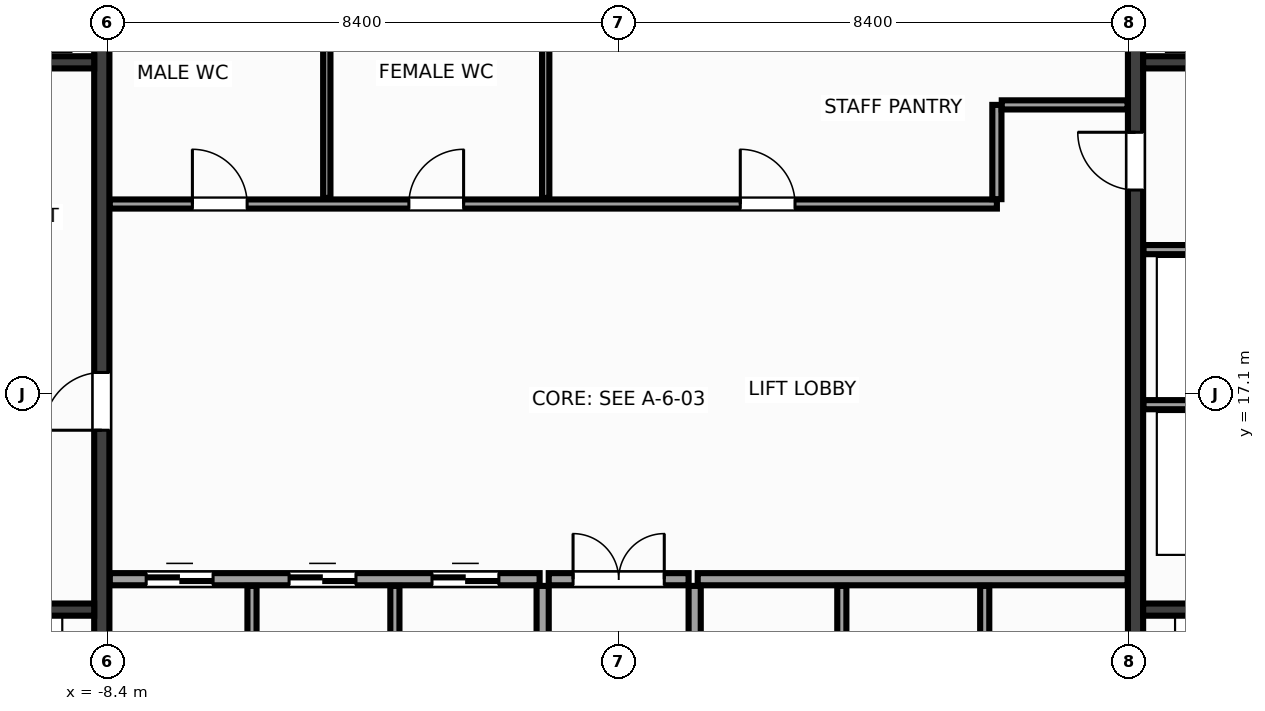
"""IFC4 building model, lengths in metres.
Left out: names, types, materials, properties, quantities, classifications, styles, units other than length and angle.
Written with IfcOpenShell. Run it as: python <this file> out.ifc"""

import sys

from ifc_helpers import new_model, si_unit, direction, frame, frame_2d, origin, place, context, subcontext, project, spatial, rectangle, extrude, source, transform, mapped, element, fill, save


model = new_model("IFC4")
c1 = context("Model", 3, precision=1e-05, world=origin(), true_north=direction((0.0, 1.0)))
c2 = subcontext(c1, "Body", "Model", "MODEL_VIEW")
j1 = project(units=[si_unit("LENGTHUNIT", "METRE"), si_unit("PLANEANGLEUNIT", "RADIAN")], contexts=[c1])
p1 = place(None, origin())
s1 = spatial("IfcSite", under=j1, at=p1, CompositionType="ELEMENT")
p2 = place(p1, origin())
s2 = spatial("IfcBuilding", under=s1, at=p2, CompositionType="ELEMENT")
p3 = place(p2, frame((0.0, 0.0, 23.6)))
s3 = spatial("IfcBuildingStorey", under=s2, at=p3, CompositionType="ELEMENT", Elevation=23.6)
m1 = source(origin(), c2, "Body", "SweptSolid", [
    extrude(rectangle(XDim=12.8, YDim=0.25, at=frame_2d((6.4, 0.0))), origin(), (0.0, 0.0, 1.0), 3.6),
])
p4 = place(p3, frame((-8.5, 10.6, 0.0), z_axis=(0.0, 0.0, 1.0), x_axis=(0.0, 1.0, 0.0)))
e1 = element("IfcWall", 1, at=p4, inside=s3, PredefinedType="SHEAR", context=c2, shape_type="MappedRepresentation", body=[
    mapped(m1, transform((0.0, 0.0, 0.0), x_axis=(1.0, 0.0, 0.0), y_axis=(0.0, 1.0, 0.0), z_axis=(0.0, 0.0, 1.0), scale=1.0)),
])
p5 = place(p4, frame((5.9, 0.0, 0.0)))
e2 = element("IfcOpeningElement", 2, at=p5, cuts=e1, PredefinedType="OPENING", context=c2, shape_type="SweptSolid", body=[
    extrude(rectangle(XDim=0.95, YDim=2.15, at=frame_2d((0.475, 1.075))), frame((0.0, 0.137, 0.0), z_axis=(0.0, -1.0, 0.0), x_axis=(1.0, 0.0, 0.0)), (0.0, 0.0, 1.0), 0.274),
])
p6 = place(p3, frame((8.5, 10.6, 0.0), z_axis=(0.0, 0.0, 1.0), x_axis=(0.0, 1.0, 0.0)))
e3 = element("IfcWall", 3, at=p6, inside=s3, PredefinedType="SHEAR", context=c2, shape_type="MappedRepresentation", body=[
    mapped(m1, transform((0.0, 0.0, 0.0), x_axis=(1.0, 0.0, 0.0), y_axis=(0.0, 1.0, 0.0), z_axis=(0.0, 0.0, 1.0), scale=1.0)),
])
p7 = place(p6, frame((9.85, 0.0, 0.0)))
e4 = element("IfcOpeningElement", 4, at=p7, cuts=e3, PredefinedType="OPENING", context=c2, shape_type="SweptSolid", body=[
    extrude(rectangle(XDim=0.95, YDim=2.15, at=frame_2d((0.475, 1.075))), frame((0.0, 0.137, 0.0), z_axis=(0.0, -1.0, 0.0), x_axis=(1.0, 0.0, 0.0)), (0.0, 0.0, 1.0), 0.274),
])
m2 = source(origin(), c2, "Body", "SweptSolid", [
    extrude(rectangle(XDim=2.825, YDim=0.2, at=frame_2d((1.413, 0.0))), origin(), (0.0, 0.0, 1.0), 3.6),
])
for number, where, z_axis, x_axis in (
    (5, (-11.45, 13.55, 0.0), (0.0, 0.0, 1.0), (1.0, 0.0, 0.0)),
    (6, (8.625, 13.55, 0.0), (0.0, 0.0, 1.0), (1.0, 0.0, 0.0)),
):
    element("IfcWall", number, at=place(p3, frame(where, z_axis=z_axis, x_axis=x_axis)), inside=s3, PredefinedType="SHEAR", context=c2, shape_type="MappedRepresentation", body=[
        mapped(m2, transform((0.0, 0.0, 0.0), x_axis=(1.0, 0.0, 0.0), y_axis=(0.0, 1.0, 0.0), z_axis=(0.0, 0.0, 1.0), scale=1.0)),
    ])
m3 = source(origin(), c2, "Body", "SweptSolid", [
    extrude(rectangle(XDim=3.02, YDim=0.2, at=frame_2d((1.51, 0.0))), origin(), (0.0, 0.0, 1.0), 3.6),
])
for number, where, z_axis, x_axis in (
    (7, (-11.645, 22.55, 0.0), (0.0, 0.0, 1.0), (1.0, 0.0, 0.0)),
    (8, (8.625, 22.55, 0.0), (0.0, 0.0, 1.0), (1.0, 0.0, 0.0)),
):
    element("IfcWall", number, at=place(p3, frame(where, z_axis=z_axis, x_axis=x_axis)), inside=s3, PredefinedType="SHEAR", context=c2, shape_type="MappedRepresentation", body=[
        mapped(m3, transform((0.0, 0.0, 0.0), x_axis=(1.0, 0.0, 0.0), y_axis=(0.0, 1.0, 0.0), z_axis=(0.0, 0.0, 1.0), scale=1.0)),
    ])
m4 = source(origin(), c2, "Body", "SweptSolid", [
    extrude(rectangle(XDim=3.01, YDim=0.15, at=frame_2d((1.505, 0.0))), origin(), (0.0, 0.0, 1.0), 3.36),
])
for number, where, z_axis, x_axis in (
    (9, (8.63, 16.92, 0.0), (0.0, 0.0, 1.0), (1.0, 0.0, 0.0)),
    (10, (8.63, 19.47, 0.0), (0.0, 0.0, 1.0), (1.0, 0.0, 0.0)),
):
    element("IfcWall", number, at=place(p3, frame(where, z_axis=z_axis, x_axis=x_axis)), inside=s3, PredefinedType="PARTITIONING", context=c2, shape_type="MappedRepresentation", body=[
        mapped(m4, transform((0.0, 0.0, 0.0), x_axis=(1.0, 0.0, 0.0), y_axis=(0.0, 1.0, 0.0), z_axis=(0.0, 0.0, 1.0), scale=1.0)),
    ])
m5 = source(origin(), c2, "Body", "SweptSolid", [
    extrude(rectangle(XDim=7.07, YDim=0.2, at=frame_2d((3.535, 0.0))), origin(), (0.0, 0.0, 1.0), 3.36),
])
p8 = place(p3, frame((-8.37, 14.05, 0.0), z_axis=(0.0, 0.0, 1.0), x_axis=(1.0, 0.0, 0.0)))
e11 = element("IfcWall", 11, at=p8, inside=s3, PredefinedType="PARTITIONING", context=c2, shape_type="MappedRepresentation", body=[
    mapped(m5, transform((0.0, 0.0, 0.0), x_axis=(1.0, 0.0, 0.0), y_axis=(0.0, 1.0, 0.0), z_axis=(0.0, 0.0, 1.0), scale=1.0)),
])
p9 = place(p8, frame((0.6, 0.0, 0.0)))
e12 = element("IfcOpeningElement", 12, at=p9, cuts=e11, PredefinedType="OPENING", context=c2, shape_type="SweptSolid", body=[
    extrude(rectangle(XDim=1.1, YDim=2.15, at=frame_2d((0.55, 1.075))), frame((0.0, 0.112, 0.0), z_axis=(0.0, -1.0, 0.0), x_axis=(1.0, 0.0, 0.0)), (0.0, 0.0, 1.0), 0.224),
])
p10 = place(p8, frame((2.95, 0.0, 0.0)))
e13 = element("IfcOpeningElement", 13, at=p10, cuts=e11, PredefinedType="OPENING", context=c2, shape_type="SweptSolid", body=[
    extrude(rectangle(XDim=1.1, YDim=2.15, at=frame_2d((0.55, 1.075))), frame((0.0, 0.112, 0.0), z_axis=(0.0, -1.0, 0.0), x_axis=(1.0, 0.0, 0.0)), (0.0, 0.0, 1.0), 0.224),
])
p11 = place(p8, frame((5.3, 0.0, 0.0)))
e14 = element("IfcOpeningElement", 14, at=p11, cuts=e11, PredefinedType="OPENING", context=c2, shape_type="SweptSolid", body=[
    extrude(rectangle(XDim=1.1, YDim=2.15, at=frame_2d((0.55, 1.075))), frame((0.0, 0.112, 0.0), z_axis=(0.0, -1.0, 0.0), x_axis=(1.0, 0.0, 0.0)), (0.0, 0.0, 1.0), 0.224),
])
p12 = place(p3, frame((1.3, 14.05, 0.0), z_axis=(0.0, 0.0, 1.0), x_axis=(1.0, 0.0, 0.0)))
e15 = element("IfcWall", 15, at=p12, inside=s3, PredefinedType="PARTITIONING", context=c2, shape_type="MappedRepresentation", body=[
    mapped(m5, transform((0.0, 0.0, 0.0), x_axis=(1.0, 0.0, 0.0), y_axis=(0.0, 1.0, 0.0), z_axis=(0.0, 0.0, 1.0), scale=1.0)),
])
m6 = source(origin(), c2, "Body", "SweptSolid", [
    extrude(rectangle(XDim=3.34, YDim=0.2, at=frame_2d((1.67, 0.0))), origin(), (0.0, 0.0, 1.0), 3.36),
])
for number, where, z_axis, x_axis in (
    (16, (-1.25, 10.6, 0.0), (0.0, 0.0, 1.0), (0.0, 1.0, 0.0)),
    (17, (1.25, 10.6, 0.0), (0.0, 0.0, 1.0), (0.0, 1.0, 0.0)),
):
    element("IfcWall", number, at=place(p3, frame(where, z_axis=z_axis, x_axis=x_axis)), inside=s3, PredefinedType="PARTITIONING", context=c2, shape_type="MappedRepresentation", body=[
        mapped(m6, transform((0.0, 0.0, 0.0), x_axis=(1.0, 0.0, 0.0), y_axis=(0.0, 1.0, 0.0), z_axis=(0.0, 0.0, 1.0), scale=1.0)),
    ])
m7 = source(origin(), c2, "Body", "SweptSolid", [
    extrude(rectangle(XDim=2.3, YDim=0.2, at=frame_2d((1.15, 0.0))), origin(), (0.0, 0.0, 1.0), 3.36),
])
p13 = place(p3, frame((-1.15, 14.05, 0.0), z_axis=(0.0, 0.0, 1.0), x_axis=(1.0, 0.0, 0.0)))
e18 = element("IfcWall", 18, at=p13, inside=s3, PredefinedType="PARTITIONING", context=c2, shape_type="MappedRepresentation", body=[
    mapped(m7, transform((0.0, 0.0, 0.0), x_axis=(1.0, 0.0, 0.0), y_axis=(0.0, 1.0, 0.0), z_axis=(0.0, 0.0, 1.0), scale=1.0)),
])
p14 = place(p13, frame((0.4, 0.0, 0.0)))
e19 = element("IfcOpeningElement", 19, at=p14, cuts=e18, PredefinedType="OPENING", context=c2, shape_type="SweptSolid", body=[
    extrude(rectangle(XDim=1.5, YDim=2.2, at=frame_2d((0.75, 1.1))), frame((0.0, 0.112, 0.0), z_axis=(0.0, -1.0, 0.0), x_axis=(1.0, 0.0, 0.0)), (0.0, 0.0, 1.0), 0.224),
])
m8 = source(origin(), c2, "Body", "SweptSolid", [
    extrude(rectangle(XDim=14.59, YDim=0.15, at=frame_2d((7.295, 0.0))), origin(), (0.0, 0.0, 1.0), 3.36),
])
p15 = place(p3, frame((-8.37, 20.22, 0.0), z_axis=(0.0, 0.0, 1.0), x_axis=(1.0, 0.0, 0.0)))
e20 = element("IfcWall", 20, at=p15, inside=s3, PredefinedType="PARTITIONING", context=c2, shape_type="MappedRepresentation", body=[
    mapped(m8, transform((0.0, 0.0, 0.0), x_axis=(1.0, 0.0, 0.0), y_axis=(0.0, 1.0, 0.0), z_axis=(0.0, 0.0, 1.0), scale=1.0)),
])
p16 = place(p15, frame((1.36, 0.0, 0.0)))
e21 = element("IfcOpeningElement", 21, at=p16, cuts=e20, PredefinedType="OPENING", context=c2, shape_type="SweptSolid", body=[
    extrude(rectangle(XDim=0.9, YDim=2.15, at=frame_2d((0.45, 1.075))), frame((0.0, 0.087, 0.0), z_axis=(0.0, -1.0, 0.0), x_axis=(1.0, 0.0, 0.0)), (0.0, 0.0, 1.0), 0.174),
])
p17 = place(p15, frame((4.92, 0.0, 0.0)))
e22 = element("IfcOpeningElement", 22, at=p17, cuts=e20, PredefinedType="OPENING", context=c2, shape_type="SweptSolid", body=[
    extrude(rectangle(XDim=0.9, YDim=2.15, at=frame_2d((0.45, 1.075))), frame((0.0, 0.087, 0.0), z_axis=(0.0, -1.0, 0.0), x_axis=(1.0, 0.0, 0.0)), (0.0, 0.0, 1.0), 0.174),
])
p18 = place(p15, frame((10.37, 0.0, 0.0)))
e23 = element("IfcOpeningElement", 23, at=p18, cuts=e20, PredefinedType="OPENING", context=c2, shape_type="SweptSolid", body=[
    extrude(rectangle(XDim=0.9, YDim=2.15, at=frame_2d((0.45, 1.075))), frame((0.0, 0.087, 0.0), z_axis=(0.0, -1.0, 0.0), x_axis=(1.0, 0.0, 0.0)), (0.0, 0.0, 1.0), 0.174),
])
m9 = source(origin(), c2, "Body", "SweptSolid", [
    extrude(rectangle(XDim=1.55, YDim=0.15, at=frame_2d((0.775, 0.0))), origin(), (0.0, 0.0, 1.0), 3.36),
])
p19 = place(p3, frame((6.22, 20.3, 0.0), z_axis=(0.0, 0.0, 1.0), x_axis=(0.0, 1.0, 0.0)))
e24 = element("IfcWall", 24, at=p19, inside=s3, PredefinedType="PARTITIONING", context=c2, shape_type="MappedRepresentation", body=[
    mapped(m9, transform((0.0, 0.0, 0.0), x_axis=(1.0, 0.0, 0.0), y_axis=(0.0, 1.0, 0.0), z_axis=(0.0, 0.0, 1.0), scale=1.0)),
])
m10 = source(origin(), c2, "Body", "SweptSolid", [
    extrude(rectangle(XDim=2.07, YDim=0.15, at=frame_2d((1.035, 0.0))), origin(), (0.0, 0.0, 1.0), 3.36),
])
p20 = place(p3, frame((6.3, 21.85, 0.0), z_axis=(0.0, 0.0, 1.0), x_axis=(1.0, 0.0, 0.0)))
e25 = element("IfcWall", 25, at=p20, inside=s3, PredefinedType="PARTITIONING", context=c2, shape_type="MappedRepresentation", body=[
    mapped(m10, transform((0.0, 0.0, 0.0), x_axis=(1.0, 0.0, 0.0), y_axis=(0.0, 1.0, 0.0), z_axis=(0.0, 0.0, 1.0), scale=1.0)),
])
m11 = source(origin(), c2, "Body", "SweptSolid", [
    extrude(rectangle(XDim=3.34, YDim=0.15, at=frame_2d((1.67, 0.0))), origin(), (0.0, 0.0, 1.0), 3.36),
])
for number, where, z_axis, x_axis in (
    (26, (-6.03, 10.6, 0.0), (0.0, 0.0, 1.0), (0.0, 1.0, 0.0)),
    (27, (-3.68, 10.6, 0.0), (0.0, 0.0, 1.0), (0.0, 1.0, 0.0)),
    (28, (3.67, 10.6, 0.0), (0.0, 0.0, 1.0), (0.0, 1.0, 0.0)),
    (29, (6.02, 10.6, 0.0), (0.0, 0.0, 1.0), (0.0, 1.0, 0.0)),
):
    element("IfcWall", number, at=place(p3, frame(where, z_axis=z_axis, x_axis=x_axis)), inside=s3, PredefinedType="PARTITIONING", context=c2, shape_type="MappedRepresentation", body=[
        mapped(m11, transform((0.0, 0.0, 0.0), x_axis=(1.0, 0.0, 0.0), y_axis=(0.0, 1.0, 0.0), z_axis=(0.0, 0.0, 1.0), scale=1.0)),
    ])
m12 = source(origin(), c2, "Body", "SweptSolid", [
    extrude(rectangle(XDim=3.04, YDim=0.12, at=frame_2d((1.52, 0.0))), origin(), (0.0, 0.0, 1.0), 3.36),
])
for number, where, z_axis, x_axis in (
    (30, (-4.8, 20.32, 0.0), (0.0, 0.0, 1.0), (0.0, 1.0, 0.0)),
    (31, (-1.2, 20.32, 0.0), (0.0, 0.0, 1.0), (0.0, 1.0, 0.0)),
):
    element("IfcWall", number, at=place(p3, frame(where, z_axis=z_axis, x_axis=x_axis)), inside=s3, PredefinedType="PARTITIONING", context=c2, shape_type="MappedRepresentation", body=[
        mapped(m12, transform((0.0, 0.0, 0.0), x_axis=(1.0, 0.0, 0.0), y_axis=(0.0, 1.0, 0.0), z_axis=(0.0, 0.0, 1.0), scale=1.0)),
    ])
m13 = source(origin(), c2, "Body", "SweptSolid", [
    extrude(rectangle(XDim=0.95, YDim=2.15, at=frame_2d((0.475, 1.075))), frame((0.0, 0.025, 0.0), z_axis=(0.0, -1.0, 0.0), x_axis=(1.0, 0.0, 0.0)), (0.0, 0.0, 1.0), 0.05),
])
p21 = place(p5, origin())
e32 = element("IfcDoor", 32, at=p21, inside=s3, OperationType="SINGLE_SWING_LEFT", PredefinedType="DOOR", context=c2, shape_type="MappedRepresentation", body=[
    mapped(m13, transform((0.0, 0.0, 0.0), x_axis=(1.0, 0.0, 0.0), y_axis=(0.0, 1.0, 0.0), z_axis=(0.0, 0.0, 1.0), scale=1.0)),
])
fill(e2, e32)
m14 = source(origin(), c2, "Body", "SweptSolid", [
    extrude(rectangle(XDim=0.95, YDim=2.15, at=frame_2d((0.475, 1.075))), frame((0.0, 0.025, 0.0), z_axis=(0.0, -1.0, 0.0), x_axis=(1.0, 0.0, 0.0)), (0.0, 0.0, 1.0), 0.05),
])
p22 = place(p7, origin())
e33 = element("IfcDoor", 33, at=p22, inside=s3, OperationType="SINGLE_SWING_RIGHT", PredefinedType="DOOR", context=c2, shape_type="MappedRepresentation", body=[
    mapped(m14, transform((0.0, 0.0, 0.0), x_axis=(1.0, 0.0, 0.0), y_axis=(0.0, 1.0, 0.0), z_axis=(0.0, 0.0, 1.0), scale=1.0)),
])
fill(e4, e33)
m15 = source(origin(), c2, "Body", "SweptSolid", [
    extrude(rectangle(XDim=1.1, YDim=2.15, at=frame_2d((0.55, 1.075))), frame((0.0, 0.025, 0.0), z_axis=(0.0, -1.0, 0.0), x_axis=(1.0, 0.0, 0.0)), (0.0, 0.0, 1.0), 0.05),
])
p23 = place(p9, origin())
e34 = element("IfcDoor", 34, at=p23, inside=s3, OperationType="DOUBLE_DOOR_SLIDING", PredefinedType="DOOR", context=c2, shape_type="MappedRepresentation", body=[
    mapped(m15, transform((0.0, 0.0, 0.0), x_axis=(1.0, 0.0, 0.0), y_axis=(0.0, 1.0, 0.0), z_axis=(0.0, 0.0, 1.0), scale=1.0)),
])
fill(e12, e34)
p24 = place(p10, origin())
e35 = element("IfcDoor", 35, at=p24, inside=s3, OperationType="DOUBLE_DOOR_SLIDING", PredefinedType="DOOR", context=c2, shape_type="MappedRepresentation", body=[
    mapped(m15, transform((0.0, 0.0, 0.0), x_axis=(1.0, 0.0, 0.0), y_axis=(0.0, 1.0, 0.0), z_axis=(0.0, 0.0, 1.0), scale=1.0)),
])
fill(e13, e35)
p25 = place(p11, origin())
e36 = element("IfcDoor", 36, at=p25, inside=s3, OperationType="DOUBLE_DOOR_SLIDING", PredefinedType="DOOR", context=c2, shape_type="MappedRepresentation", body=[
    mapped(m15, transform((0.0, 0.0, 0.0), x_axis=(1.0, 0.0, 0.0), y_axis=(0.0, 1.0, 0.0), z_axis=(0.0, 0.0, 1.0), scale=1.0)),
])
fill(e14, e36)
m16 = source(origin(), c2, "Body", "SweptSolid", [
    extrude(rectangle(XDim=1.5, YDim=2.2, at=frame_2d((0.75, 1.1))), frame((0.0, 0.025, 0.0), z_axis=(0.0, -1.0, 0.0), x_axis=(1.0, 0.0, 0.0)), (0.0, 0.0, 1.0), 0.05),
])
p26 = place(p14, origin())
e37 = element("IfcDoor", 37, at=p26, inside=s3, OperationType="DOUBLE_DOOR_SINGLE_SWING", PredefinedType="DOOR", context=c2, shape_type="MappedRepresentation", body=[
    mapped(m16, transform((0.0, 0.0, 0.0), x_axis=(1.0, 0.0, 0.0), y_axis=(0.0, 1.0, 0.0), z_axis=(0.0, 0.0, 1.0), scale=1.0)),
])
fill(e19, e37)
m17 = source(origin(), c2, "Body", "SweptSolid", [
    extrude(rectangle(XDim=0.9, YDim=2.15, at=frame_2d((0.45, 1.075))), frame((0.0, 0.025, 0.0), z_axis=(0.0, -1.0, 0.0), x_axis=(1.0, 0.0, 0.0)), (0.0, 0.0, 1.0), 0.05),
])
p27 = place(p16, origin())
e38 = element("IfcDoor", 38, at=p27, inside=s3, OperationType="SINGLE_SWING_LEFT", PredefinedType="DOOR", context=c2, shape_type="MappedRepresentation", body=[
    mapped(m17, transform((0.0, 0.0, 0.0), x_axis=(1.0, 0.0, 0.0), y_axis=(0.0, 1.0, 0.0), z_axis=(0.0, 0.0, 1.0), scale=1.0)),
])
fill(e21, e38)
p28 = place(p17, origin())
e39 = element("IfcDoor", 39, at=p28, inside=s3, OperationType="SINGLE_SWING_RIGHT", PredefinedType="DOOR", context=c2, shape_type="MappedRepresentation", body=[
    mapped(m17, transform((0.0, 0.0, 0.0), x_axis=(1.0, 0.0, 0.0), y_axis=(0.0, 1.0, 0.0), z_axis=(0.0, 0.0, 1.0), scale=1.0)),
])
fill(e22, e39)
p29 = place(p18, origin())
e40 = element("IfcDoor", 40, at=p29, inside=s3, OperationType="SINGLE_SWING_LEFT", PredefinedType="DOOR", context=c2, shape_type="MappedRepresentation", body=[
    mapped(m17, transform((0.0, 0.0, 0.0), x_axis=(1.0, 0.0, 0.0), y_axis=(0.0, 1.0, 0.0), z_axis=(0.0, 0.0, 1.0), scale=1.0)),
])
fill(e23, e40)
save(model, sys.argv[1])
